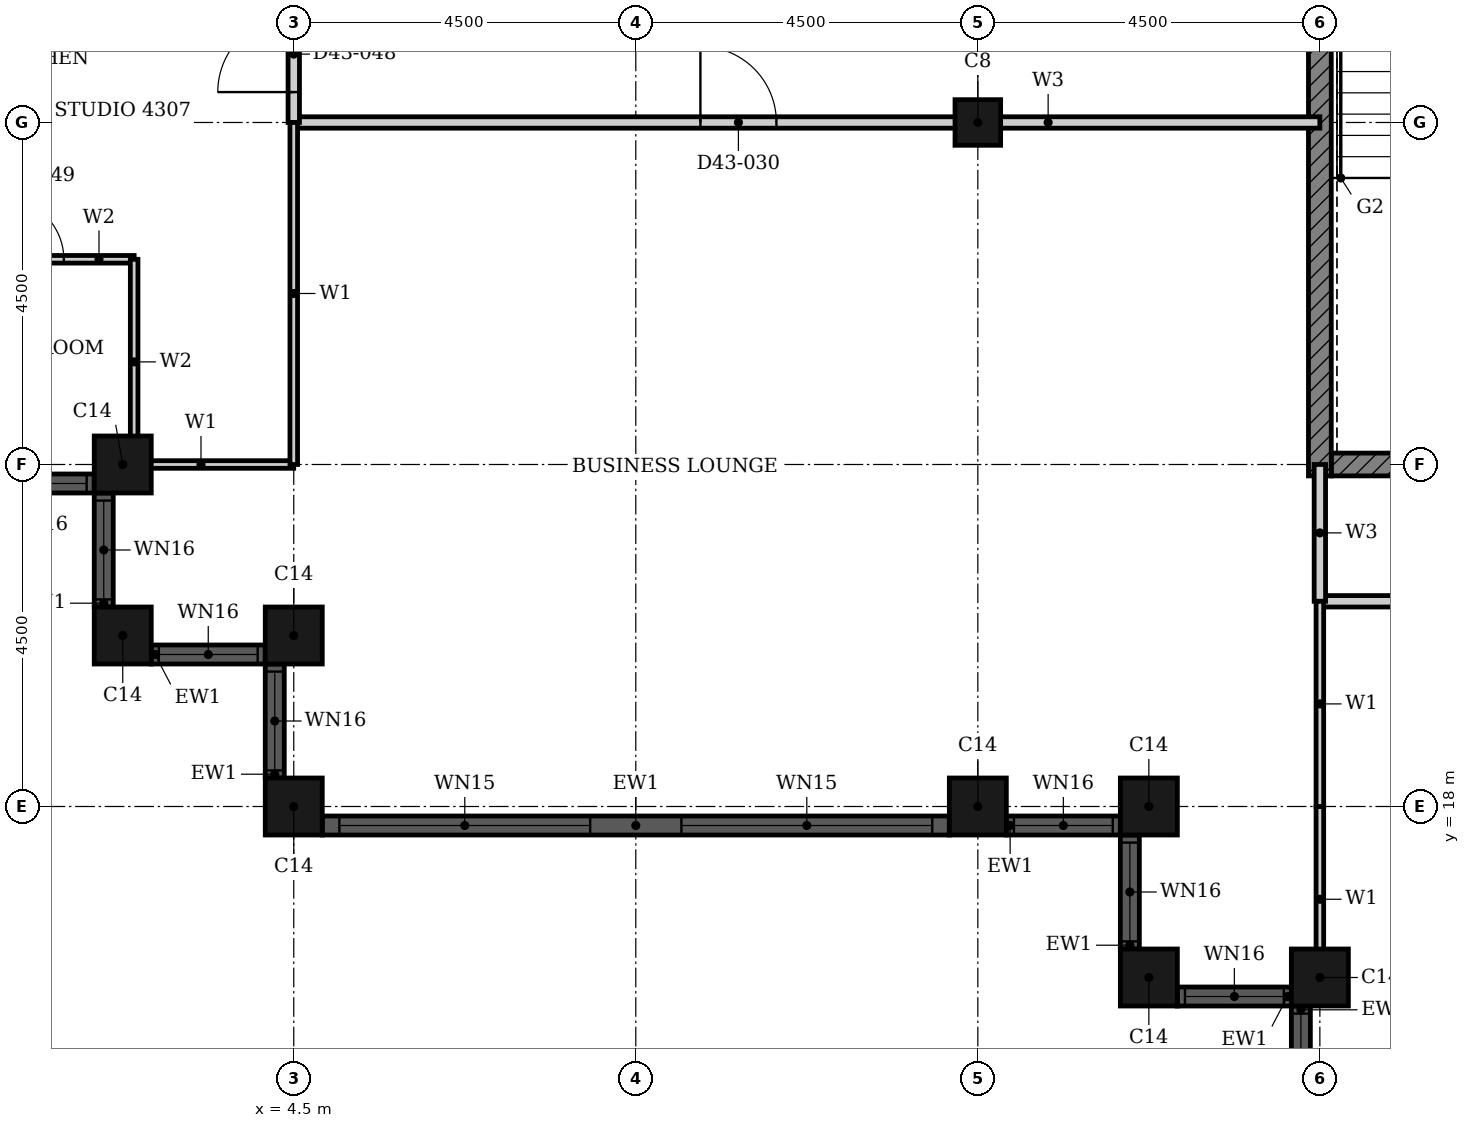
"""IFC4 building model, lengths in metres.
Left out: names, types, materials, properties, quantities, classifications, styles, units other than length and angle.
Written with IfcOpenShell. Run it as: python <this file> out.ifc"""

import sys

from ifc_helpers import new_model, si_unit, direction, frame, frame_2d, origin, origin_2d, place, context, subcontext, project, spatial, rectangle, hollow_rectangle, extrude, element, fill, save


model = new_model("IFC4")
c1 = context("Model", 3, precision=1e-05, world=origin(), true_north=direction((0.0, 1.0)))
c2 = subcontext(c1, "Body", "Model", "MODEL_VIEW")
j1 = project(units=[si_unit("LENGTHUNIT", "METRE"), si_unit("PLANEANGLEUNIT", "RADIAN")], contexts=[c1])
p1 = place(None, origin())
s1 = spatial("IfcSite", under=j1, at=p1, CompositionType="ELEMENT")
p2 = place(p1, origin())
s2 = spatial("IfcBuilding", under=s1, at=p2, CompositionType="ELEMENT")
p3 = place(p2, frame((0.0, 0.0, 172.8)))
s3 = spatial("IfcBuildingStorey", under=s2, at=p3, CompositionType="ELEMENT", Elevation=172.8)
for number, where, z_axis, x_axis in (
    (1, (2.25, 22.5, 0.0), (0.0, 0.0, 1.0), (1.0, 0.0, 0.0)),
    (2, (2.25, 20.25, 0.0), (0.0, 0.0, 1.0), (1.0, 0.0, 0.0)),
    (3, (4.5, 20.25, 0.0), (0.0, 0.0, 1.0), (1.0, 0.0, 0.0)),
    (4, (4.5, 18.0, 0.0), (0.0, 0.0, 1.0), (1.0, 0.0, 0.0)),
    (5, (13.5, 18.0, 0.0), (0.0, 0.0, 1.0), (1.0, 0.0, 0.0)),
    (6, (15.75, 18.0, 0.0), (0.0, 0.0, 1.0), (1.0, 0.0, 0.0)),
    (7, (15.75, 15.75, 0.0), (0.0, 0.0, 1.0), (1.0, 0.0, 0.0)),
    (8, (18.0, 15.75, 0.0), (0.0, 0.0, 1.0), (1.0, 0.0, 0.0)),
):
    element("IfcColumn", number, at=place(p3, frame(where, z_axis=z_axis, x_axis=x_axis)), inside=s3, PredefinedType="COLUMN", context=c2, shape_type="SweptSolid", body=[
        extrude(hollow_rectangle(XDim=0.75, YDim=0.75, WallThickness=0.024, at=origin_2d()), origin(), (0.0, 0.0, 1.0), 3.7),
    ])
p4 = place(p3, frame((13.5, 27.0, 0.0), z_axis=(0.0, 0.0, 1.0), x_axis=(1.0, 0.0, 0.0)))
e9 = element("IfcColumn", 9, at=p4, inside=s3, PredefinedType="COLUMN", context=c2, shape_type="SweptSolid", body=[
    extrude(hollow_rectangle(XDim=0.6, YDim=0.6, WallThickness=0.02, at=origin_2d()), origin(), (0.0, 0.0, 1.0), 3.7),
])
p5 = place(p3, frame((0.375, 22.25, 0.0), z_axis=(0.0, 0.0, 1.0), x_axis=(1.0, 0.0, 0.0)))
e10 = element("IfcWall", 10, at=p5, inside=s3, PredefinedType="SOLIDWALL", context=c2, shape_type="SweptSolid", body=[
    extrude(rectangle(XDim=1.5, YDim=0.25, at=frame_2d((0.75, 0.0))), origin(), (0.0, 0.0, 1.0), 3.7),
])
p6 = place(p5, frame((0.1, 0.0, 0.9)))
e11 = element("IfcOpeningElement", 11, at=p6, cuts=e10, PredefinedType="OPENING", context=c2, shape_type="SweptSolid", body=[
    extrude(rectangle(XDim=1.3, YDim=1.85, at=frame_2d((0.65, 0.925))), frame((0.0, 0.135, 0.0), z_axis=(0.0, -1.0, 0.0), x_axis=(1.0, 0.0, 0.0)), (0.0, 0.0, 1.0), 0.27),
])
p7 = place(p3, frame((2.0, 22.125, 0.0), z_axis=(0.0, 0.0, 1.0), x_axis=(0.0, -1.0, 0.0)))
e12 = element("IfcWall", 12, at=p7, inside=s3, PredefinedType="SOLIDWALL", context=c2, shape_type="SweptSolid", body=[
    extrude(rectangle(XDim=1.5, YDim=0.25, at=frame_2d((0.75, 0.0))), origin(), (0.0, 0.0, 1.0), 3.7),
])
p8 = place(p7, frame((0.1, 0.0, 0.9)))
e13 = element("IfcOpeningElement", 13, at=p8, cuts=e12, PredefinedType="OPENING", context=c2, shape_type="SweptSolid", body=[
    extrude(rectangle(XDim=1.3, YDim=1.85, at=frame_2d((0.65, 0.925))), frame((0.0, 0.135, 0.0), z_axis=(0.0, -1.0, 0.0), x_axis=(1.0, 0.0, 0.0)), (0.0, 0.0, 1.0), 0.27),
])
p9 = place(p3, frame((2.625, 20.0, 0.0), z_axis=(0.0, 0.0, 1.0), x_axis=(1.0, 0.0, 0.0)))
e14 = element("IfcWall", 14, at=p9, inside=s3, PredefinedType="SOLIDWALL", context=c2, shape_type="SweptSolid", body=[
    extrude(rectangle(XDim=1.5, YDim=0.25, at=frame_2d((0.75, 0.0))), origin(), (0.0, 0.0, 1.0), 3.7),
])
p10 = place(p9, frame((0.1, 0.0, 0.9)))
e15 = element("IfcOpeningElement", 15, at=p10, cuts=e14, PredefinedType="OPENING", context=c2, shape_type="SweptSolid", body=[
    extrude(rectangle(XDim=1.3, YDim=1.85, at=frame_2d((0.65, 0.925))), frame((0.0, 0.135, 0.0), z_axis=(0.0, -1.0, 0.0), x_axis=(1.0, 0.0, 0.0)), (0.0, 0.0, 1.0), 0.27),
])
p11 = place(p3, frame((4.25, 19.875, 0.0), z_axis=(0.0, 0.0, 1.0), x_axis=(0.0, -1.0, 0.0)))
e16 = element("IfcWall", 16, at=p11, inside=s3, PredefinedType="SOLIDWALL", context=c2, shape_type="SweptSolid", body=[
    extrude(rectangle(XDim=1.5, YDim=0.25, at=frame_2d((0.75, 0.0))), origin(), (0.0, 0.0, 1.0), 3.7),
])
p12 = place(p11, frame((0.1, 0.0, 0.9)))
e17 = element("IfcOpeningElement", 17, at=p12, cuts=e16, PredefinedType="OPENING", context=c2, shape_type="SweptSolid", body=[
    extrude(rectangle(XDim=1.3, YDim=1.85, at=frame_2d((0.65, 0.925))), frame((0.0, 0.135, 0.0), z_axis=(0.0, -1.0, 0.0), x_axis=(1.0, 0.0, 0.0)), (0.0, 0.0, 1.0), 0.27),
])
p13 = place(p3, frame((4.875, 17.75, 0.0), z_axis=(0.0, 0.0, 1.0), x_axis=(1.0, 0.0, 0.0)))
e18 = element("IfcWall", 18, at=p13, inside=s3, PredefinedType="SOLIDWALL", context=c2, shape_type="SweptSolid", body=[
    extrude(rectangle(XDim=8.25, YDim=0.25, at=frame_2d((4.125, 0.0))), origin(), (0.0, 0.0, 1.0), 3.7),
])
p14 = place(p13, frame((0.225, 0.0, 0.45)))
e19 = element("IfcOpeningElement", 19, at=p14, cuts=e18, PredefinedType="OPENING", context=c2, shape_type="SweptSolid", body=[
    extrude(rectangle(XDim=3.3, YDim=2.3, at=frame_2d((1.65, 1.15))), frame((0.0, 0.135, 0.0), z_axis=(0.0, -1.0, 0.0), x_axis=(1.0, 0.0, 0.0)), (0.0, 0.0, 1.0), 0.27),
])
p15 = place(p13, frame((4.725, 0.0, 0.45)))
e20 = element("IfcOpeningElement", 20, at=p15, cuts=e18, PredefinedType="OPENING", context=c2, shape_type="SweptSolid", body=[
    extrude(rectangle(XDim=3.3, YDim=2.3, at=frame_2d((1.65, 1.15))), frame((0.0, 0.135, 0.0), z_axis=(0.0, -1.0, 0.0), x_axis=(1.0, 0.0, 0.0)), (0.0, 0.0, 1.0), 0.27),
])
p16 = place(p3, frame((13.875, 17.75, 0.0), z_axis=(0.0, 0.0, 1.0), x_axis=(1.0, 0.0, 0.0)))
e21 = element("IfcWall", 21, at=p16, inside=s3, PredefinedType="SOLIDWALL", context=c2, shape_type="SweptSolid", body=[
    extrude(rectangle(XDim=1.5, YDim=0.25, at=frame_2d((0.75, 0.0))), origin(), (0.0, 0.0, 1.0), 3.7),
])
p17 = place(p16, frame((0.1, 0.0, 0.9)))
e22 = element("IfcOpeningElement", 22, at=p17, cuts=e21, PredefinedType="OPENING", context=c2, shape_type="SweptSolid", body=[
    extrude(rectangle(XDim=1.3, YDim=1.85, at=frame_2d((0.65, 0.925))), frame((0.0, 0.135, 0.0), z_axis=(0.0, -1.0, 0.0), x_axis=(1.0, 0.0, 0.0)), (0.0, 0.0, 1.0), 0.27),
])
p18 = place(p3, frame((15.5, 17.625, 0.0), z_axis=(0.0, 0.0, 1.0), x_axis=(0.0, -1.0, 0.0)))
e23 = element("IfcWall", 23, at=p18, inside=s3, PredefinedType="SOLIDWALL", context=c2, shape_type="SweptSolid", body=[
    extrude(rectangle(XDim=1.5, YDim=0.25, at=frame_2d((0.75, 0.0))), origin(), (0.0, 0.0, 1.0), 3.7),
])
p19 = place(p18, frame((0.1, 0.0, 0.9)))
e24 = element("IfcOpeningElement", 24, at=p19, cuts=e23, PredefinedType="OPENING", context=c2, shape_type="SweptSolid", body=[
    extrude(rectangle(XDim=1.3, YDim=1.85, at=frame_2d((0.65, 0.925))), frame((0.0, 0.135, 0.0), z_axis=(0.0, -1.0, 0.0), x_axis=(1.0, 0.0, 0.0)), (0.0, 0.0, 1.0), 0.27),
])
p20 = place(p3, frame((16.125, 15.5, 0.0), z_axis=(0.0, 0.0, 1.0), x_axis=(1.0, 0.0, 0.0)))
e25 = element("IfcWall", 25, at=p20, inside=s3, PredefinedType="SOLIDWALL", context=c2, shape_type="SweptSolid", body=[
    extrude(rectangle(XDim=1.5, YDim=0.25, at=frame_2d((0.75, 0.0))), origin(), (0.0, 0.0, 1.0), 3.7),
])
p21 = place(p20, frame((0.1, 0.0, 0.9)))
e26 = element("IfcOpeningElement", 26, at=p21, cuts=e25, PredefinedType="OPENING", context=c2, shape_type="SweptSolid", body=[
    extrude(rectangle(XDim=1.3, YDim=1.85, at=frame_2d((0.65, 0.925))), frame((0.0, 0.135, 0.0), z_axis=(0.0, -1.0, 0.0), x_axis=(1.0, 0.0, 0.0)), (0.0, 0.0, 1.0), 0.27),
])
p22 = place(p3, frame((17.75, 15.375, 0.0), z_axis=(0.0, 0.0, 1.0), x_axis=(0.0, -1.0, 0.0)))
e27 = element("IfcWall", 27, at=p22, inside=s3, PredefinedType="SOLIDWALL", context=c2, shape_type="SweptSolid", body=[
    extrude(rectangle(XDim=1.5, YDim=0.25, at=frame_2d((0.75, 0.0))), origin(), (0.0, 0.0, 1.0), 3.7),
])
p23 = place(p22, frame((0.1, 0.0, 0.9)))
e28 = element("IfcOpeningElement", 28, at=p23, cuts=e27, PredefinedType="OPENING", context=c2, shape_type="SweptSolid", body=[
    extrude(rectangle(XDim=1.3, YDim=1.85, at=frame_2d((0.65, 0.925))), frame((0.0, 0.135, 0.0), z_axis=(0.0, -1.0, 0.0), x_axis=(1.0, 0.0, 0.0)), (0.0, 0.0, 1.0), 0.27),
])
p24 = place(p3, frame((18.15, 22.5, 0.0), z_axis=(0.0, 0.0, 1.0), x_axis=(1.0, 0.0, 0.0)))
e29 = element("IfcWall", 29, at=p24, inside=s3, PredefinedType="SHEAR", context=c2, shape_type="SweptSolid", body=[
    extrude(rectangle(XDim=4.225, YDim=0.3, at=frame_2d((2.113, 0.0))), origin(), (0.0, 0.0, 1.0), 3.4),
])
p25 = place(p3, frame((18.0, 22.35, 0.0), z_axis=(0.0, 0.0, 1.0), x_axis=(0.0, 1.0, 0.0)))
e30 = element("IfcWall", 30, at=p25, inside=s3, PredefinedType="SHEAR", context=c2, shape_type="SweptSolid", body=[
    extrude(rectangle(XDim=9.3, YDim=0.3, at=frame_2d((4.65, 0.0))), origin(), (0.0, 0.0, 1.0), 3.4),
])
p26 = place(p3, frame((18.0, 20.7, 0.0), z_axis=(0.0, 0.0, 1.0), x_axis=(1.0, 0.0, 0.0)))
e31 = element("IfcWall", 31, at=p26, inside=s3, PredefinedType="PARTITIONING", context=c2, shape_type="SweptSolid", body=[
    extrude(rectangle(XDim=13.5, YDim=0.15, at=frame_2d((6.75, 0.0))), origin(), (0.0, 0.0, 1.0), 3.4),
])
p27 = place(p26, frame((6.25, 0.0, 0.0)))
e32 = element("IfcOpeningElement", 32, at=p27, cuts=e31, PredefinedType="OPENING", context=c2, shape_type="SweptSolid", body=[
    extrude(rectangle(XDim=1.0, YDim=2.1, at=frame_2d((0.5, 1.05))), frame((0.0, 0.085, 0.0), z_axis=(0.0, -1.0, 0.0), x_axis=(1.0, 0.0, 0.0)), (0.0, 0.0, 1.0), 0.17),
])
p28 = place(p3, frame((4.5, 27.0, 0.0), z_axis=(0.0, 0.0, 1.0), x_axis=(1.0, 0.0, 0.0)))
e33 = element("IfcWall", 33, at=p28, inside=s3, PredefinedType="PARTITIONING", context=c2, shape_type="SweptSolid", body=[
    extrude(rectangle(XDim=13.5, YDim=0.15, at=frame_2d((6.75, 0.0))), origin(), (0.0, 0.0, 1.0), 2.68),
])
p29 = place(p28, frame((5.35, 0.0, 0.0)))
e34 = element("IfcOpeningElement", 34, at=p29, cuts=e33, PredefinedType="OPENING", context=c2, shape_type="SweptSolid", body=[
    extrude(rectangle(XDim=1.0, YDim=2.1, at=frame_2d((0.5, 1.05))), frame((0.0, 0.085, 0.0), z_axis=(0.0, -1.0, 0.0), x_axis=(1.0, 0.0, 0.0)), (0.0, 0.0, 1.0), 0.17),
])
p30 = place(p3, frame((18.0, 20.7, 0.0), z_axis=(0.0, 0.0, 1.0), x_axis=(0.0, 1.0, 0.0)))
e35 = element("IfcWall", 35, at=p30, inside=s3, PredefinedType="PARTITIONING", context=c2, shape_type="SweptSolid", body=[
    extrude(rectangle(XDim=1.8, YDim=0.15, at=frame_2d((0.9, 0.0))), origin(), (0.0, 0.0, 1.0), 3.4),
])
p31 = place(p3, frame((4.5, 27.0, 0.0), z_axis=(0.0, 0.0, 1.0), x_axis=(0.0, 1.0, 0.0)))
e36 = element("IfcWall", 36, at=p31, inside=s3, PredefinedType="PARTITIONING", context=c2, shape_type="SweptSolid", body=[
    extrude(rectangle(XDim=1.8, YDim=0.15, at=frame_2d((0.9, 0.0))), origin(), (0.0, 0.0, 1.0), 3.4),
])
p32 = place(p31, frame((0.4, 0.0, 0.0)))
e37 = element("IfcOpeningElement", 37, at=p32, cuts=e36, PredefinedType="OPENING", context=c2, shape_type="SweptSolid", body=[
    extrude(rectangle(XDim=1.0, YDim=2.2, at=frame_2d((0.5, 1.1))), frame((0.0, 0.085, 0.0), z_axis=(0.0, -1.0, 0.0), x_axis=(1.0, 0.0, 0.0)), (0.0, 0.0, 1.0), 0.17),
])
p33 = place(p3, frame((2.06, 22.5, 0.0), z_axis=(0.0, 0.0, 1.0), x_axis=(1.0, 0.0, 0.0)))
e38 = element("IfcWall", 38, at=p33, inside=s3, PredefinedType="PARTITIONING", context=c2, shape_type="SweptSolid", body=[
    extrude(rectangle(XDim=2.439, YDim=0.1, at=frame_2d((1.219, 0.0))), origin(), (0.0, 0.0, 1.0), 2.68),
])
p34 = place(p3, frame((18.0, 15.56, 0.0), z_axis=(0.0, 0.0, 1.0), x_axis=(0.0, 1.0, 0.0)))
e39 = element("IfcWall", 39, at=p34, inside=s3, PredefinedType="PARTITIONING", context=c2, shape_type="SweptSolid", body=[
    extrude(rectangle(XDim=2.439, YDim=0.1, at=frame_2d((1.219, 0.0))), origin(), (0.0, 0.0, 1.0), 3.4),
])
p35 = place(p3, frame((18.0, 18.0, 0.0), z_axis=(0.0, 0.0, 1.0), x_axis=(0.0, 1.0, 0.0)))
e40 = element("IfcWall", 40, at=p35, inside=s3, PredefinedType="PARTITIONING", context=c2, shape_type="SweptSolid", body=[
    extrude(rectangle(XDim=2.7, YDim=0.1, at=frame_2d((1.35, 0.0))), origin(), (0.0, 0.0, 1.0), 3.4),
])
p36 = place(p3, frame((4.5, 22.5, 0.0), z_axis=(0.0, 0.0, 1.0), x_axis=(0.0, 1.0, 0.0)))
e41 = element("IfcWall", 41, at=p36, inside=s3, PredefinedType="PARTITIONING", context=c2, shape_type="SweptSolid", body=[
    extrude(rectangle(XDim=4.5, YDim=0.1, at=frame_2d((2.25, 0.0))), origin(), (0.0, 0.0, 1.0), 3.4),
])
p37 = place(p3, frame((-0.125, 25.2, 0.0), z_axis=(0.0, 0.0, 1.0), x_axis=(1.0, 0.0, 0.0)))
e42 = element("IfcWall", 42, at=p37, inside=s3, PredefinedType="PARTITIONING", context=c2, shape_type="SweptSolid", body=[
    extrude(rectangle(XDim=2.525, YDim=0.1, at=frame_2d((1.262, 0.0))), origin(), (0.0, 0.0, 1.0), 3.4),
])
p38 = place(p37, frame((0.8, 0.0, 0.0)))
e43 = element("IfcOpeningElement", 43, at=p38, cuts=e42, PredefinedType="OPENING", context=c2, shape_type="SweptSolid", body=[
    extrude(rectangle(XDim=0.8, YDim=2.1, at=frame_2d((0.4, 1.05))), frame((0.0, 0.06, 0.0), z_axis=(0.0, -1.0, 0.0), x_axis=(1.0, 0.0, 0.0)), (0.0, 0.0, 1.0), 0.12),
])
p39 = place(p3, frame((2.4, 22.5, 0.0), z_axis=(0.0, 0.0, 1.0), x_axis=(0.0, 1.0, 0.0)))
e44 = element("IfcWall", 44, at=p39, inside=s3, PredefinedType="PARTITIONING", context=c2, shape_type="SweptSolid", body=[
    extrude(rectangle(XDim=2.7, YDim=0.1, at=frame_2d((1.35, 0.0))), origin(), (0.0, 0.0, 1.0), 3.4),
])
p40 = place(p6, origin())
e45 = element("IfcWindow", 45, at=p40, inside=s3, PartitioningType="SINGLE_PANEL", PredefinedType="WINDOW", context=c2, shape_type="SweptSolid", body=[
    extrude(rectangle(XDim=1.3, YDim=1.85, at=frame_2d((0.65, 0.925))), frame((0.0, 0.03, 0.0), z_axis=(0.0, -1.0, 0.0), x_axis=(1.0, 0.0, 0.0)), (0.0, 0.0, 1.0), 0.06),
])
fill(e11, e45)
p41 = place(p8, origin())
e46 = element("IfcWindow", 46, at=p41, inside=s3, PartitioningType="SINGLE_PANEL", PredefinedType="WINDOW", context=c2, shape_type="SweptSolid", body=[
    extrude(rectangle(XDim=1.3, YDim=1.85, at=frame_2d((0.65, 0.925))), frame((0.0, 0.03, 0.0), z_axis=(0.0, -1.0, 0.0), x_axis=(1.0, 0.0, 0.0)), (0.0, 0.0, 1.0), 0.06),
])
fill(e13, e46)
p42 = place(p10, origin())
e47 = element("IfcWindow", 47, at=p42, inside=s3, PartitioningType="SINGLE_PANEL", PredefinedType="WINDOW", context=c2, shape_type="SweptSolid", body=[
    extrude(rectangle(XDim=1.3, YDim=1.85, at=frame_2d((0.65, 0.925))), frame((0.0, 0.03, 0.0), z_axis=(0.0, -1.0, 0.0), x_axis=(1.0, 0.0, 0.0)), (0.0, 0.0, 1.0), 0.06),
])
fill(e15, e47)
p43 = place(p12, origin())
e48 = element("IfcWindow", 48, at=p43, inside=s3, PartitioningType="SINGLE_PANEL", PredefinedType="WINDOW", context=c2, shape_type="SweptSolid", body=[
    extrude(rectangle(XDim=1.3, YDim=1.85, at=frame_2d((0.65, 0.925))), frame((0.0, 0.03, 0.0), z_axis=(0.0, -1.0, 0.0), x_axis=(1.0, 0.0, 0.0)), (0.0, 0.0, 1.0), 0.06),
])
fill(e17, e48)
p44 = place(p14, origin())
e49 = element("IfcWindow", 49, at=p44, inside=s3, PartitioningType="SINGLE_PANEL", PredefinedType="WINDOW", context=c2, shape_type="SweptSolid", body=[
    extrude(rectangle(XDim=3.3, YDim=2.3, at=frame_2d((1.65, 1.15))), frame((0.0, 0.03, 0.0), z_axis=(0.0, -1.0, 0.0), x_axis=(1.0, 0.0, 0.0)), (0.0, 0.0, 1.0), 0.06),
])
fill(e19, e49)
p45 = place(p15, origin())
e50 = element("IfcWindow", 50, at=p45, inside=s3, PartitioningType="SINGLE_PANEL", PredefinedType="WINDOW", context=c2, shape_type="SweptSolid", body=[
    extrude(rectangle(XDim=3.3, YDim=2.3, at=frame_2d((1.65, 1.15))), frame((0.0, 0.03, 0.0), z_axis=(0.0, -1.0, 0.0), x_axis=(1.0, 0.0, 0.0)), (0.0, 0.0, 1.0), 0.06),
])
fill(e20, e50)
p46 = place(p17, origin())
e51 = element("IfcWindow", 51, at=p46, inside=s3, PartitioningType="SINGLE_PANEL", PredefinedType="WINDOW", context=c2, shape_type="SweptSolid", body=[
    extrude(rectangle(XDim=1.3, YDim=1.85, at=frame_2d((0.65, 0.925))), frame((0.0, 0.03, 0.0), z_axis=(0.0, -1.0, 0.0), x_axis=(1.0, 0.0, 0.0)), (0.0, 0.0, 1.0), 0.06),
])
fill(e22, e51)
p47 = place(p19, origin())
e52 = element("IfcWindow", 52, at=p47, inside=s3, PartitioningType="SINGLE_PANEL", PredefinedType="WINDOW", context=c2, shape_type="SweptSolid", body=[
    extrude(rectangle(XDim=1.3, YDim=1.85, at=frame_2d((0.65, 0.925))), frame((0.0, 0.03, 0.0), z_axis=(0.0, -1.0, 0.0), x_axis=(1.0, 0.0, 0.0)), (0.0, 0.0, 1.0), 0.06),
])
fill(e24, e52)
p48 = place(p21, origin())
e53 = element("IfcWindow", 53, at=p48, inside=s3, PartitioningType="SINGLE_PANEL", PredefinedType="WINDOW", context=c2, shape_type="SweptSolid", body=[
    extrude(rectangle(XDim=1.3, YDim=1.85, at=frame_2d((0.65, 0.925))), frame((0.0, 0.03, 0.0), z_axis=(0.0, -1.0, 0.0), x_axis=(1.0, 0.0, 0.0)), (0.0, 0.0, 1.0), 0.06),
])
fill(e26, e53)
p49 = place(p23, origin())
e54 = element("IfcWindow", 54, at=p49, inside=s3, PartitioningType="SINGLE_PANEL", PredefinedType="WINDOW", context=c2, shape_type="SweptSolid", body=[
    extrude(rectangle(XDim=1.3, YDim=1.85, at=frame_2d((0.65, 0.925))), frame((0.0, 0.03, 0.0), z_axis=(0.0, -1.0, 0.0), x_axis=(1.0, 0.0, 0.0)), (0.0, 0.0, 1.0), 0.06),
])
fill(e28, e54)
p50 = place(p29, origin())
e55 = element("IfcDoor", 55, at=p50, inside=s3, OperationType="SINGLE_SWING_LEFT", PredefinedType="DOOR", context=c2, shape_type="SweptSolid", body=[
    extrude(rectangle(XDim=1.0, YDim=2.1, at=frame_2d((0.5, 1.05))), frame((0.0, 0.025, 0.0), z_axis=(0.0, -1.0, 0.0), x_axis=(1.0, 0.0, 0.0)), (0.0, 0.0, 1.0), 0.05),
])
fill(e34, e55)
p51 = place(p32, origin())
e56 = element("IfcDoor", 56, at=p51, inside=s3, OperationType="SINGLE_SWING_RIGHT", PredefinedType="DOOR", context=c2, shape_type="SweptSolid", body=[
    extrude(rectangle(XDim=1.0, YDim=2.2, at=frame_2d((0.5, 1.1))), frame((0.0, 0.025, 0.0), z_axis=(0.0, -1.0, 0.0), x_axis=(1.0, 0.0, 0.0)), (0.0, 0.0, 1.0), 0.05),
])
fill(e37, e56)
p52 = place(p38, origin())
e57 = element("IfcDoor", 57, at=p52, inside=s3, OperationType="SINGLE_SWING_LEFT", PredefinedType="DOOR", context=c2, shape_type="SweptSolid", body=[
    extrude(rectangle(XDim=0.8, YDim=2.1, at=frame_2d((0.4, 1.05))), frame((0.0, 0.025, 0.0), z_axis=(0.0, -1.0, 0.0), x_axis=(1.0, 0.0, 0.0)), (0.0, 0.0, 1.0), 0.05),
])
fill(e43, e57)
save(model, sys.argv[1])
